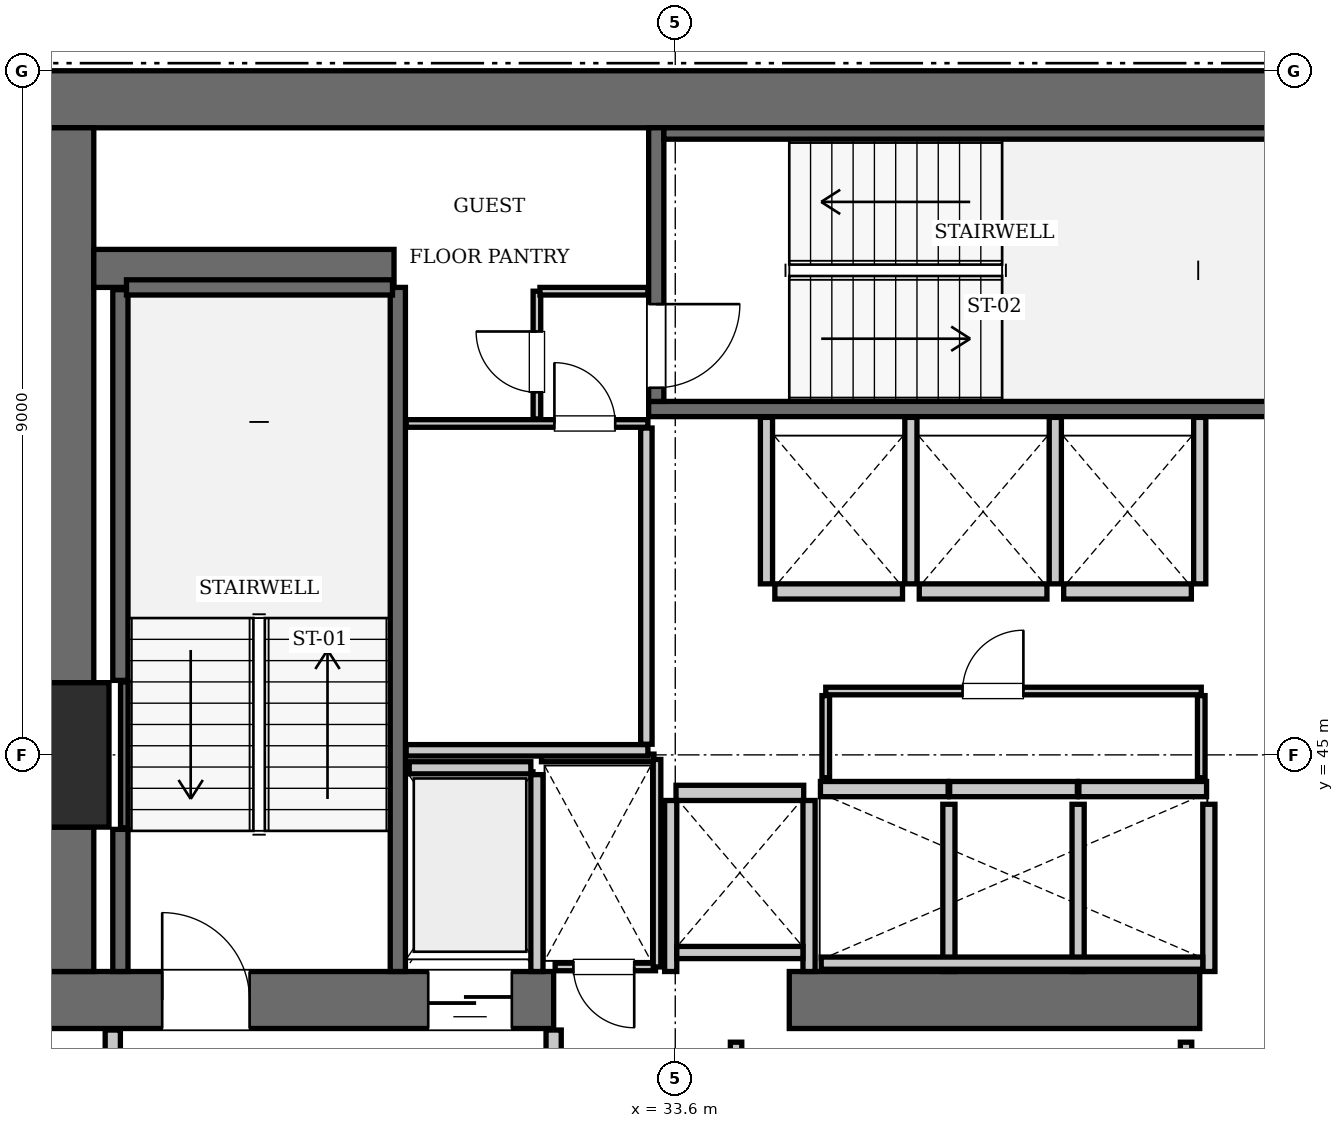
"""IFC4 building model, lengths in metres.
Left out: names, types, materials, properties, quantities, classifications, styles, units other than length and angle.
Written with IfcOpenShell. Run it as: python <this file> out.ifc"""

import sys

from ifc_helpers import new_model, si_unit, direction, frame, frame_2d, origin, origin_2d, place, context, subcontext, project, spatial, rectangle, extrude, element, fill, save


model = new_model("IFC4")
c1 = context("Model", 3, precision=1e-05, world=origin(), true_north=direction((0.0, 1.0)))
c2 = subcontext(c1, "Body", "Model", "MODEL_VIEW")
j1 = project(units=[si_unit("LENGTHUNIT", "METRE"), si_unit("PLANEANGLEUNIT", "RADIAN")], contexts=[c1])
p1 = place(None, origin())
s1 = spatial("IfcSite", under=j1, at=p1, CompositionType="ELEMENT")
p2 = place(p1, origin())
s2 = spatial("IfcBuilding", under=s1, at=p2, CompositionType="ELEMENT")
p3 = place(p2, frame((0.0, 0.0, 138.95)))
s3 = spatial("IfcBuildingStorey", under=s2, at=p3, CompositionType="ELEMENT", Elevation=138.95)
p4 = place(p3, frame((25.2, 45.0, 0.0), z_axis=(0.0, 0.0, 1.0), x_axis=(1.0, 0.0, 0.0)))
e1 = element("IfcColumn", 1, at=p4, inside=s3, PredefinedType="COLUMN", context=c2, shape_type="SweptSolid", body=[
    extrude(rectangle(XDim=1.9, YDim=1.9, at=origin_2d()), origin(), (0.0, 0.0, 1.0), 3.85),
])
p5 = place(p3, frame((25.2, 53.625, 0.0), z_axis=(0.0, 0.0, 1.0), x_axis=(1.0, 0.0, 0.0)))
e2 = element("IfcWall", 2, at=p5, inside=s3, PredefinedType="SHEAR", context=c2, shape_type="SweptSolid", body=[
    extrude(rectangle(XDim=25.2, YDim=0.75, at=frame_2d((12.6, 0.0))), origin(), (0.0, 0.0, 1.0), 3.85),
])
p6 = place(p3, frame((25.2, 41.775, 0.0), z_axis=(0.0, 0.0, 1.0), x_axis=(1.0, 0.0, 0.0)))
e3 = element("IfcWall", 3, at=p6, inside=s3, PredefinedType="SHEAR", context=c2, shape_type="SweptSolid", body=[
    extrude(rectangle(XDim=6.8, YDim=0.75, at=frame_2d((3.4, 0.0))), origin(), (0.0, 0.0, 1.0), 3.85),
])
p7 = place(p6, frame((1.65, 0.0, 0.0)))
e4 = element("IfcOpeningElement", 4, at=p7, cuts=e3, PredefinedType="OPENING", context=c2, shape_type="SweptSolid", body=[
    extrude(rectangle(XDim=1.15, YDim=2.15, at=frame_2d((0.575, 1.075))), frame((0.0, 0.385, 0.0), z_axis=(0.0, -1.0, 0.0), x_axis=(1.0, 0.0, 0.0)), (0.0, 0.0, 1.0), 0.77),
])
p8 = place(p6, frame((5.15, 0.0, 0.0)))
e5 = element("IfcOpeningElement", 5, at=p8, cuts=e3, PredefinedType="OPENING", context=c2, shape_type="SweptSolid", body=[
    extrude(rectangle(XDim=1.1, YDim=2.2, at=frame_2d((0.55, 1.1))), frame((0.0, 0.385, 0.0), z_axis=(0.0, -1.0, 0.0), x_axis=(1.0, 0.0, 0.0)), (0.0, 0.0, 1.0), 0.77),
])
p9 = place(p3, frame((35.1, 41.775, 0.0), z_axis=(0.0, 0.0, 1.0), x_axis=(1.0, 0.0, 0.0)))
e6 = element("IfcWall", 6, at=p9, inside=s3, PredefinedType="SHEAR", context=c2, shape_type="SweptSolid", body=[
    extrude(rectangle(XDim=5.4, YDim=0.75, at=frame_2d((2.7, 0.0))), origin(), (0.0, 0.0, 1.0), 3.85),
])
p10 = place(p3, frame((25.575, 42.15, 0.0), z_axis=(0.0, 0.0, 1.0), x_axis=(0.0, 1.0, 0.0)))
e7 = element("IfcWall", 7, at=p10, inside=s3, PredefinedType="SHEAR", context=c2, shape_type="SweptSolid", body=[
    extrude(rectangle(XDim=1.9, YDim=0.75, at=frame_2d((0.95, 0.0))), origin(), (0.0, 0.0, 1.0), 3.85),
])
p11 = place(p3, frame((25.575, 45.95, 0.0), z_axis=(0.0, 0.0, 1.0), x_axis=(0.0, 1.0, 0.0)))
e8 = element("IfcWall", 8, at=p11, inside=s3, PredefinedType="SHEAR", context=c2, shape_type="SweptSolid", body=[
    extrude(rectangle(XDim=7.3, YDim=0.75, at=frame_2d((3.65, 0.0))), origin(), (0.0, 0.0, 1.0), 3.85),
])
p12 = place(p3, frame((25.95, 51.4, 0.0), z_axis=(0.0, 0.0, 1.0), x_axis=(1.0, 0.0, 0.0)))
e9 = element("IfcWall", 9, at=p12, inside=s3, PredefinedType="SHEAR", context=c2, shape_type="SweptSolid", body=[
    extrude(rectangle(XDim=3.95, YDim=0.5, at=frame_2d((1.975, 0.0))), origin(), (0.0, 0.0, 1.0), 3.85),
])
p13 = place(p3, frame((29.95, 42.15, 0.0), z_axis=(0.0, 0.0, 1.0), x_axis=(0.0, 1.0, 0.0)))
e10 = element("IfcWall", 10, at=p13, inside=s3, PredefinedType="SOLIDWALL", context=c2, shape_type="SweptSolid", body=[
    extrude(rectangle(XDim=9.0, YDim=0.2, at=frame_2d((4.5, 0.0))), origin(), (0.0, 0.0, 1.0), 3.61),
])
p14 = place(p3, frame((26.3, 42.15, 0.0), z_axis=(0.0, 0.0, 1.0), x_axis=(0.0, 1.0, 0.0)))
e11 = element("IfcWall", 11, at=p14, inside=s3, PredefinedType="SOLIDWALL", context=c2, shape_type="SweptSolid", body=[
    extrude(rectangle(XDim=1.87, YDim=0.2, at=frame_2d((0.935, 0.0))), origin(), (0.0, 0.0, 1.0), 3.61),
])
p15 = place(p3, frame((26.3, 45.98, 0.0), z_axis=(0.0, 0.0, 1.0), x_axis=(0.0, 1.0, 0.0)))
e12 = element("IfcWall", 12, at=p15, inside=s3, PredefinedType="SOLIDWALL", context=c2, shape_type="SweptSolid", body=[
    extrude(rectangle(XDim=5.14, YDim=0.2, at=frame_2d((2.57, 0.0))), origin(), (0.0, 0.0, 1.0), 3.61),
])
p16 = place(p3, frame((26.38, 51.15, 0.0), z_axis=(0.0, 0.0, 1.0), x_axis=(1.0, 0.0, 0.0)))
e13 = element("IfcWall", 13, at=p16, inside=s3, PredefinedType="SOLIDWALL", context=c2, shape_type="SweptSolid", body=[
    extrude(rectangle(XDim=3.5, YDim=0.2, at=frame_2d((1.75, 0.0))), origin(), (0.0, 0.0, 1.0), 3.61),
])
p17 = place(p3, frame((26.352, 44.04, 0.0), z_axis=(0.0, 0.0, 1.0), x_axis=(0.0, 1.0, 0.0)))
e14 = element("IfcWall", 14, at=p17, inside=s3, PredefinedType="SOLIDWALL", context=c2, shape_type="SweptSolid", body=[
    extrude(rectangle(XDim=1.92, YDim=0.1, at=frame_2d((0.96, 0.0))), origin(), (0.0, 0.0, 1.0), 3.61),
])
p18 = place(p3, frame((33.25, 49.55, 0.0), z_axis=(0.0, 0.0, 1.0), x_axis=(1.0, 0.0, 0.0)))
e15 = element("IfcWall", 15, at=p18, inside=s3, PredefinedType="SOLIDWALL", context=c2, shape_type="SweptSolid", body=[
    extrude(rectangle(XDim=9.1, YDim=0.2, at=frame_2d((4.55, 0.0))), origin(), (0.0, 0.0, 1.0), 3.61),
])
p19 = place(p3, frame((33.35, 49.65, 0.0), z_axis=(0.0, 0.0, 1.0), x_axis=(0.0, 1.0, 0.0)))
e16 = element("IfcWall", 16, at=p19, inside=s3, PredefinedType="SOLIDWALL", context=c2, shape_type="SweptSolid", body=[
    extrude(rectangle(XDim=3.6, YDim=0.2, at=frame_2d((1.8, 0.0))), origin(), (0.0, 0.0, 1.0), 3.61),
])
p20 = place(p19, frame((0.18, 0.0, 0.0)))
e17 = element("IfcOpeningElement", 17, at=p20, cuts=e16, PredefinedType="OPENING", context=c2, shape_type="SweptSolid", body=[
    extrude(rectangle(XDim=1.1, YDim=2.15, at=frame_2d((0.55, 1.075))), frame((0.0, 0.11, 0.0), z_axis=(0.0, -1.0, 0.0), x_axis=(1.0, 0.0, 0.0)), (0.0, 0.0, 1.0), 0.22),
])
p21 = place(p3, frame((33.45, 53.175, 0.0), z_axis=(0.0, 0.0, 1.0), x_axis=(1.0, 0.0, 0.0)))
e18 = element("IfcWall", 18, at=p21, inside=s3, PredefinedType="SOLIDWALL", context=c2, shape_type="SweptSolid", body=[
    extrude(rectangle(XDim=8.7, YDim=0.15, at=frame_2d((4.35, 0.0))), origin(), (0.0, 0.0, 1.0), 3.61),
])
for number, where, z_axis, x_axis in (
    (19, (35.51, 44.55, 0.0), (0.0, 0.0, 1.0), (1.0, 0.0, 0.0)),
    (20, (37.21, 44.55, 0.0), (0.0, 0.0, 1.0), (1.0, 0.0, 0.0)),
):
    element("IfcWall", number, at=place(p3, frame(where, z_axis=z_axis, x_axis=x_axis)), inside=s3, PredefinedType="SOLIDWALL", context=c2, shape_type="SweptSolid", body=[
        extrude(rectangle(XDim=1.68, YDim=0.2, at=frame_2d((0.84, 0.0))), origin(), (0.0, 0.0, 1.0), 3.61),
    ])
for number, where, z_axis, x_axis in (
    (21, (38.91, 44.55, 0.0), (0.0, 0.0, 1.0), (1.0, 0.0, 0.0)),
    (22, (34.91, 47.15, 0.0), (0.0, 0.0, 1.0), (1.0, 0.0, 0.0)),
):
    element("IfcWall", number, at=place(p3, frame(where, z_axis=z_axis, x_axis=x_axis)), inside=s3, PredefinedType="SOLIDWALL", context=c2, shape_type="SweptSolid", body=[
        extrude(rectangle(XDim=1.68, YDim=0.2, at=frame_2d((0.84, 0.0))), origin(), (0.0, 0.0, 1.0), 3.61),
    ])
for number, where, z_axis, x_axis in (
    (23, (36.81, 47.15, 0.0), (0.0, 0.0, 1.0), (1.0, 0.0, 0.0)),
    (24, (38.71, 47.15, 0.0), (0.0, 0.0, 1.0), (1.0, 0.0, 0.0)),
    (25, (33.61, 44.5, 0.0), (0.0, 0.0, 1.0), (1.0, 0.0, 0.0)),
):
    element("IfcWall", number, at=place(p3, frame(where, z_axis=z_axis, x_axis=x_axis)), inside=s3, PredefinedType="SOLIDWALL", context=c2, shape_type="SweptSolid", body=[
        extrude(rectangle(XDim=1.68, YDim=0.2, at=frame_2d((0.84, 0.0))), origin(), (0.0, 0.0, 1.0), 3.61),
    ])
p22 = place(p3, frame((30.1, 44.83, 0.0), z_axis=(0.0, 0.0, 1.0), x_axis=(1.0, 0.0, 0.0)))
e26 = element("IfcWall", 26, at=p22, inside=s3, PredefinedType="SOLIDWALL", context=c2, shape_type="SweptSolid", body=[
    extrude(rectangle(XDim=1.6, YDim=0.16, at=frame_2d((0.8, 0.0))), origin(), (0.0, 0.0, 1.0), 3.61),
])
p23 = place(p3, frame((31.78, 42.15, 0.0), z_axis=(0.0, 0.0, 1.0), x_axis=(0.0, 1.0, 0.0)))
e27 = element("IfcWall", 27, at=p23, inside=s3, PredefinedType="SOLIDWALL", context=c2, shape_type="SweptSolid", body=[
    extrude(rectangle(XDim=2.59, YDim=0.16, at=frame_2d((1.295, 0.0))), origin(), (0.0, 0.0, 1.0), 3.61),
])
for number, where, z_axis, x_axis in (
    (28, (37.2, 42.15, 0.0), (0.0, 0.0, 1.0), (0.0, 1.0, 0.0)),
    (29, (38.9, 42.15, 0.0), (0.0, 0.0, 1.0), (0.0, 1.0, 0.0)),
    (30, (40.62, 42.15, 0.0), (0.0, 0.0, 1.0), (0.0, 1.0, 0.0)),
):
    element("IfcWall", number, at=place(p3, frame(where, z_axis=z_axis, x_axis=x_axis)), inside=s3, PredefinedType="SOLIDWALL", context=c2, shape_type="SweptSolid", body=[
        extrude(rectangle(XDim=2.2, YDim=0.16, at=frame_2d((1.1, 0.0))), origin(), (0.0, 0.0, 1.0), 3.61),
    ])
p24 = place(p3, frame((35.52, 42.26, 0.0), z_axis=(0.0, 0.0, 1.0), x_axis=(1.0, 0.0, 0.0)))
e31 = element("IfcWall", 31, at=p24, inside=s3, PredefinedType="SOLIDWALL", context=c2, shape_type="SweptSolid", body=[
    extrude(rectangle(XDim=5.02, YDim=0.16, at=frame_2d((2.51, 0.0))), origin(), (0.0, 0.0, 1.0), 3.61),
])
for number, where, z_axis, x_axis in (
    (32, (34.8, 47.25, 0.0), (0.0, 0.0, 1.0), (0.0, 1.0, 0.0)),
    (33, (36.7, 47.25, 0.0), (0.0, 0.0, 1.0), (0.0, 1.0, 0.0)),
    (34, (38.6, 47.25, 0.0), (0.0, 0.0, 1.0), (0.0, 1.0, 0.0)),
    (35, (40.5, 47.25, 0.0), (0.0, 0.0, 1.0), (0.0, 1.0, 0.0)),
):
    element("IfcWall", number, at=place(p3, frame(where, z_axis=z_axis, x_axis=x_axis)), inside=s3, PredefinedType="SOLIDWALL", context=c2, shape_type="SweptSolid", body=[
        extrude(rectangle(XDim=2.19, YDim=0.16, at=frame_2d((1.095, 0.0))), origin(), (0.0, 0.0, 1.0), 3.61),
    ])
for number, where, z_axis, x_axis in (
    (36, (33.54, 42.15, 0.0), (0.0, 0.0, 1.0), (0.0, 1.0, 0.0)),
    (37, (35.36, 42.15, 0.0), (0.0, 0.0, 1.0), (0.0, 1.0, 0.0)),
):
    element("IfcWall", number, at=place(p3, frame(where, z_axis=z_axis, x_axis=x_axis)), inside=s3, PredefinedType="SOLIDWALL", context=c2, shape_type="SweptSolid", body=[
        extrude(rectangle(XDim=2.25, YDim=0.16, at=frame_2d((1.125, 0.0))), origin(), (0.0, 0.0, 1.0), 3.61),
    ])
p25 = place(p3, frame((33.62, 42.4, 0.0), z_axis=(0.0, 0.0, 1.0), x_axis=(1.0, 0.0, 0.0)))
e38 = element("IfcWall", 38, at=p25, inside=s3, PredefinedType="SOLIDWALL", context=c2, shape_type="SweptSolid", body=[
    extrude(rectangle(XDim=1.66, YDim=0.16, at=frame_2d((0.83, 0.0))), origin(), (0.0, 0.0, 1.0), 3.61),
])
for number, where, z_axis, x_axis in (
    (39, (26.2, 38.31, 0.0), (0.0, 0.0, 1.0), (0.0, 1.0, 0.0)),
    (40, (32.0, 38.31, 0.0), (0.0, 0.0, 1.0), (0.0, 1.0, 0.0)),
):
    element("IfcWall", number, at=place(p3, frame(where, z_axis=z_axis, x_axis=x_axis)), inside=s3, PredefinedType="PARTITIONING", context=c2, shape_type="SweptSolid", body=[
        extrude(rectangle(XDim=3.07, YDim=0.2, at=frame_2d((1.535, 0.0))), origin(), (0.0, 0.0, 1.0), 3.61),
    ])
p26 = place(p3, frame((32.02, 42.21, 0.0), z_axis=(0.0, 0.0, 1.0), x_axis=(1.0, 0.0, 0.0)))
e41 = element("IfcWall", 41, at=p26, inside=s3, PredefinedType="PARTITIONING", context=c2, shape_type="SweptSolid", body=[
    extrude(rectangle(XDim=1.32, YDim=0.1, at=frame_2d((0.66, 0.0))), origin(), (0.0, 0.0, 1.0), 3.61),
])
p27 = place(p26, frame((0.24, 0.0, 0.0)))
e42 = element("IfcOpeningElement", 42, at=p27, cuts=e41, PredefinedType="OPENING", context=c2, shape_type="SweptSolid", body=[
    extrude(rectangle(XDim=0.8, YDim=2.05, at=frame_2d((0.4, 1.025))), frame((0.0, 0.06, 0.0), z_axis=(0.0, -1.0, 0.0), x_axis=(1.0, 0.0, 0.0)), (0.0, 0.0, 1.0), 0.12),
])
p28 = place(p3, frame((31.84, 44.96, 0.0), z_axis=(0.0, 0.0, 1.0), x_axis=(1.0, 0.0, 0.0)))
e43 = element("IfcWall", 43, at=p28, inside=s3, PredefinedType="PARTITIONING", context=c2, shape_type="SweptSolid", body=[
    extrude(rectangle(XDim=1.48, YDim=0.1, at=frame_2d((0.74, 0.0))), origin(), (0.0, 0.0, 1.0), 3.61),
])
p29 = place(p3, frame((33.36, 42.21, 0.0), z_axis=(0.0, 0.0, 1.0), x_axis=(0.0, 1.0, 0.0)))
e44 = element("IfcWall", 44, at=p29, inside=s3, PredefinedType="PARTITIONING", context=c2, shape_type="SweptSolid", body=[
    extrude(rectangle(XDim=2.73, YDim=0.1, at=frame_2d((1.365, 0.0))), origin(), (0.0, 0.0, 1.0), 3.61),
])
p30 = place(p3, frame((35.58, 45.84, 0.0), z_axis=(0.0, 0.0, 1.0), x_axis=(1.0, 0.0, 0.0)))
e45 = element("IfcWall", 45, at=p30, inside=s3, PredefinedType="PARTITIONING", context=c2, shape_type="SweptSolid", body=[
    extrude(rectangle(XDim=4.94, YDim=0.1, at=frame_2d((2.47, 0.0))), origin(), (0.0, 0.0, 1.0), 3.61),
])
p31 = place(p30, frame((1.8, 0.0, 0.0)))
e46 = element("IfcOpeningElement", 46, at=p31, cuts=e45, PredefinedType="OPENING", context=c2, shape_type="SweptSolid", body=[
    extrude(rectangle(XDim=0.8, YDim=2.05, at=frame_2d((0.4, 1.025))), frame((0.0, 0.06, 0.0), z_axis=(0.0, -1.0, 0.0), x_axis=(1.0, 0.0, 0.0)), (0.0, 0.0, 1.0), 0.12),
])
for number, where, z_axis, x_axis in (
    (47, (35.58, 44.7, 0.0), (0.0, 0.0, 1.0), (0.0, 1.0, 0.0)),
    (48, (40.52, 44.7, 0.0), (0.0, 0.0, 1.0), (0.0, 1.0, 0.0)),
):
    element("IfcWall", number, at=place(p3, frame(where, z_axis=z_axis, x_axis=x_axis)), inside=s3, PredefinedType="PARTITIONING", context=c2, shape_type="SweptSolid", body=[
        extrude(rectangle(XDim=1.08, YDim=0.1, at=frame_2d((0.54, 0.0))), origin(), (0.0, 0.0, 1.0), 3.61),
    ])
p32 = place(p3, frame((30.06, 45.06, 0.0), z_axis=(0.0, 0.0, 1.0), x_axis=(1.0, 0.0, 0.0)))
e49 = element("IfcWall", 49, at=p32, inside=s3, PredefinedType="PARTITIONING", context=c2, shape_type="SweptSolid", body=[
    extrude(rectangle(XDim=3.18, YDim=0.15, at=frame_2d((1.59, 0.0))), origin(), (0.0, 0.0, 1.0), 3.61),
])
p33 = place(p3, frame((33.22, 45.14, 0.0), z_axis=(0.0, 0.0, 1.0), x_axis=(0.0, 1.0, 0.0)))
e50 = element("IfcWall", 50, at=p33, inside=s3, PredefinedType="PARTITIONING", context=c2, shape_type="SweptSolid", body=[
    extrude(rectangle(XDim=4.16, YDim=0.15, at=frame_2d((2.08, 0.0))), origin(), (0.0, 0.0, 1.0), 3.61),
])
p34 = place(p3, frame((30.06, 49.36, 0.0), z_axis=(0.0, 0.0, 1.0), x_axis=(1.0, 0.0, 0.0)))
e51 = element("IfcWall", 51, at=p34, inside=s3, PredefinedType="PARTITIONING", context=c2, shape_type="SweptSolid", body=[
    extrude(rectangle(XDim=3.18, YDim=0.1, at=frame_2d((1.59, 0.0))), origin(), (0.0, 0.0, 1.0), 3.61),
])
p35 = place(p34, frame((1.95, 0.0, 0.0)))
e52 = element("IfcOpeningElement", 52, at=p35, cuts=e51, PredefinedType="OPENING", context=c2, shape_type="SweptSolid", body=[
    extrude(rectangle(XDim=0.8, YDim=2.05, at=frame_2d((0.4, 1.025))), frame((0.0, 0.06, 0.0), z_axis=(0.0, -1.0, 0.0), x_axis=(1.0, 0.0, 0.0)), (0.0, 0.0, 1.0), 0.12),
])
p36 = place(p3, frame((31.78, 49.42, 0.0), z_axis=(0.0, 0.0, 1.0), x_axis=(0.0, 1.0, 0.0)))
e53 = element("IfcWall", 53, at=p36, inside=s3, PredefinedType="PARTITIONING", context=c2, shape_type="SweptSolid", body=[
    extrude(rectangle(XDim=1.68, YDim=0.1, at=frame_2d((0.84, 0.0))), origin(), (0.0, 0.0, 1.0), 3.61),
])
p37 = place(p36, frame((0.35, 0.0, 0.0)))
e54 = element("IfcOpeningElement", 54, at=p37, cuts=e53, PredefinedType="OPENING", context=c2, shape_type="SweptSolid", body=[
    extrude(rectangle(XDim=0.8, YDim=2.05, at=frame_2d((0.4, 1.025))), frame((0.0, 0.06, 0.0), z_axis=(0.0, -1.0, 0.0), x_axis=(1.0, 0.0, 0.0)), (0.0, 0.0, 1.0), 0.12),
])
p38 = place(p3, frame((31.82, 51.1, 0.0), z_axis=(0.0, 0.0, 1.0), x_axis=(1.0, 0.0, 0.0)))
e55 = element("IfcWall", 55, at=p38, inside=s3, PredefinedType="PARTITIONING", context=c2, shape_type="SweptSolid", body=[
    extrude(rectangle(XDim=1.42, YDim=0.1, at=frame_2d((0.71, 0.0))), origin(), (0.0, 0.0, 1.0), 3.61),
])
for number, where, z_axis, x_axis in (
    (56, (34.4, 38.38, 0.0), (0.0, 0.0, 1.0), (0.0, 1.0, 0.0)),
    (57, (40.32, 38.38, 0.0), (0.0, 0.0, 1.0), (0.0, 1.0, 0.0)),
):
    element("IfcWall", number, at=place(p3, frame(where, z_axis=z_axis, x_axis=x_axis)), inside=s3, PredefinedType="PARTITIONING", context=c2, shape_type="SweptSolid", body=[
        extrude(rectangle(XDim=2.84, YDim=0.15, at=frame_2d((1.42, 0.0))), origin(), (0.0, 0.0, 1.0), 3.61),
    ])
p39 = place(p7, origin())
e58 = element("IfcDoor", 58, at=p39, inside=s3, OperationType="SINGLE_SWING_LEFT", PredefinedType="DOOR", context=c2, shape_type="SweptSolid", body=[
    extrude(rectangle(XDim=1.15, YDim=2.15, at=frame_2d((0.575, 1.075))), frame((0.0, 0.025, 0.0), z_axis=(0.0, -1.0, 0.0), x_axis=(1.0, 0.0, 0.0)), (0.0, 0.0, 1.0), 0.05),
])
fill(e4, e58)
p40 = place(p20, frame((1.1, 0.0, 0.0), z_axis=(0.0, 0.0, 1.0), x_axis=(-1.0, 0.0, 0.0)))
e59 = element("IfcDoor", 59, at=p40, inside=s3, OperationType="SINGLE_SWING_LEFT", PredefinedType="DOOR", context=c2, shape_type="SweptSolid", body=[
    extrude(rectangle(XDim=1.1, YDim=2.15, at=frame_2d((0.55, 1.075))), frame((0.0, 0.025, 0.0), z_axis=(0.0, -1.0, 0.0), x_axis=(1.0, 0.0, 0.0)), (0.0, 0.0, 1.0), 0.05),
])
fill(e17, e59)
p41 = place(p8, frame((1.1, 0.0, 0.0), z_axis=(0.0, 0.0, 1.0), x_axis=(-1.0, 0.0, 0.0)))
e60 = element("IfcDoor", 60, at=p41, inside=s3, OperationType="SLIDING_TO_LEFT", PredefinedType="DOOR", context=c2, shape_type="SweptSolid", body=[
    extrude(rectangle(XDim=1.1, YDim=2.2, at=frame_2d((0.55, 1.1))), frame((0.0, 0.025, 0.0), z_axis=(0.0, -1.0, 0.0), x_axis=(1.0, 0.0, 0.0)), (0.0, 0.0, 1.0), 0.05),
])
fill(e5, e60)
p42 = place(p27, frame((0.8, 0.0, 0.0), z_axis=(0.0, 0.0, 1.0), x_axis=(-1.0, 0.0, 0.0)))
e61 = element("IfcDoor", 61, at=p42, inside=s3, OperationType="SINGLE_SWING_LEFT", PredefinedType="DOOR", context=c2, shape_type="SweptSolid", body=[
    extrude(rectangle(XDim=0.8, YDim=2.05, at=frame_2d((0.4, 1.025))), frame((0.0, 0.025, 0.0), z_axis=(0.0, -1.0, 0.0), x_axis=(1.0, 0.0, 0.0)), (0.0, 0.0, 1.0), 0.05),
])
fill(e42, e61)
p43 = place(p31, origin())
e62 = element("IfcDoor", 62, at=p43, inside=s3, OperationType="SINGLE_SWING_RIGHT", PredefinedType="DOOR", context=c2, shape_type="SweptSolid", body=[
    extrude(rectangle(XDim=0.8, YDim=2.05, at=frame_2d((0.4, 1.025))), frame((0.0, 0.025, 0.0), z_axis=(0.0, -1.0, 0.0), x_axis=(1.0, 0.0, 0.0)), (0.0, 0.0, 1.0), 0.05),
])
fill(e46, e62)
p44 = place(p35, origin())
e63 = element("IfcDoor", 63, at=p44, inside=s3, OperationType="SINGLE_SWING_LEFT", PredefinedType="DOOR", context=c2, shape_type="SweptSolid", body=[
    extrude(rectangle(XDim=0.8, YDim=2.05, at=frame_2d((0.4, 1.025))), frame((0.0, 0.025, 0.0), z_axis=(0.0, -1.0, 0.0), x_axis=(1.0, 0.0, 0.0)), (0.0, 0.0, 1.0), 0.05),
])
fill(e52, e63)
p45 = place(p37, origin())
e64 = element("IfcDoor", 64, at=p45, inside=s3, OperationType="SINGLE_SWING_RIGHT", PredefinedType="DOOR", context=c2, shape_type="SweptSolid", body=[
    extrude(rectangle(XDim=0.8, YDim=2.05, at=frame_2d((0.4, 1.025))), frame((0.0, 0.025, 0.0), z_axis=(0.0, -1.0, 0.0), x_axis=(1.0, 0.0, 0.0)), (0.0, 0.0, 1.0), 0.05),
])
fill(e54, e64)
save(model, sys.argv[1])
